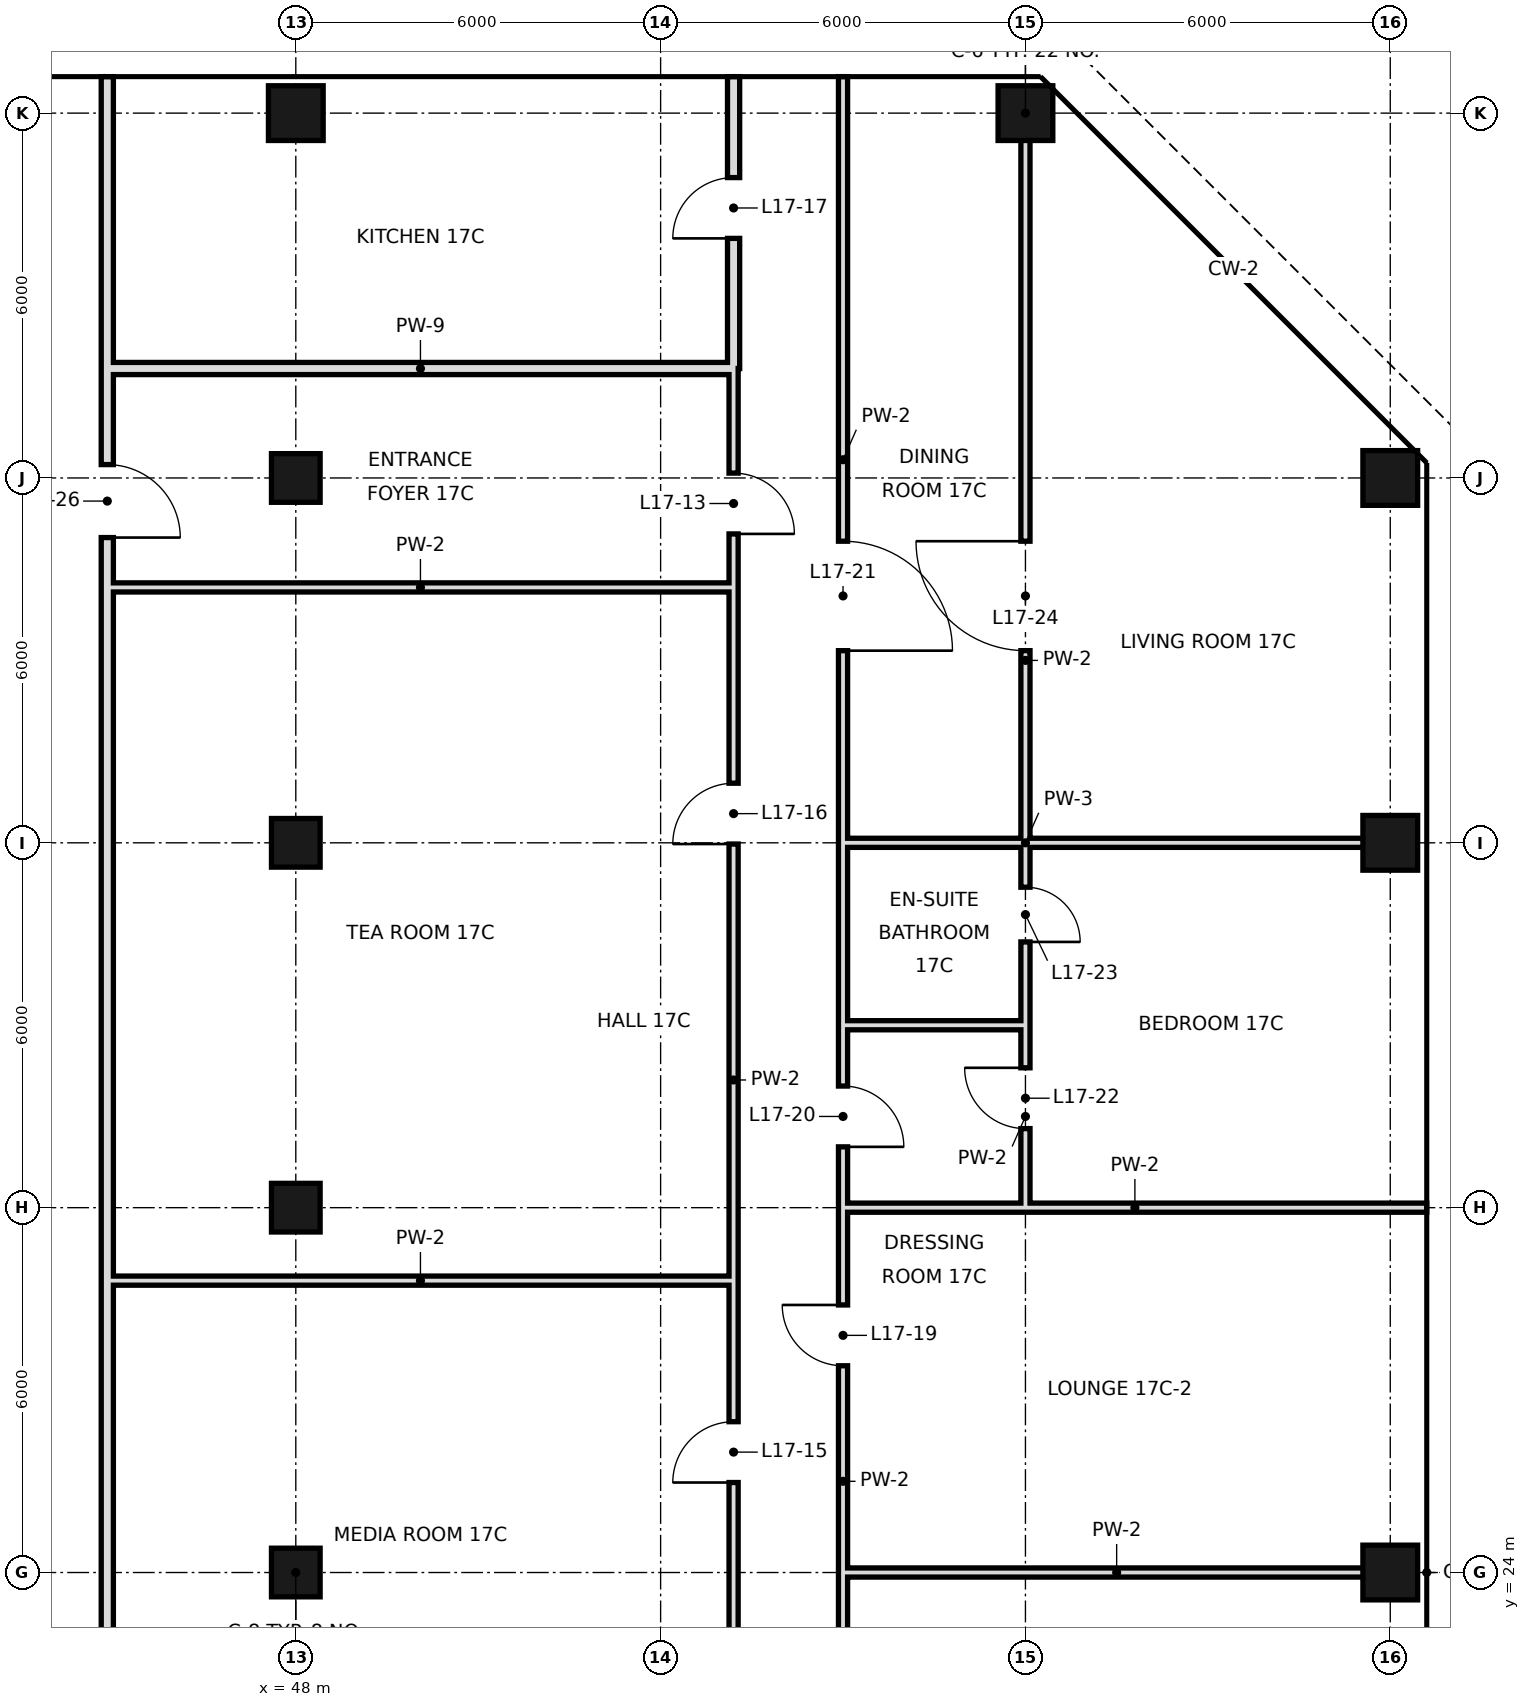
"""IFC4 building model, lengths in metres.
Left out: names, types, materials, properties, quantities, classifications, styles, units other than length and angle.
Written with IfcOpenShell. Run it as: python <this file> out.ifc"""

import sys

from ifc_helpers import new_model, si_unit, direction, frame, frame_2d, origin, origin_2d, place, context, subcontext, project, spatial, rectangle, hollow_rectangle, extrude, element, fill, save


model = new_model("IFC4")
c1 = context("Model", 3, precision=1e-05, world=origin(), true_north=direction((0.0, 1.0)))
c2 = subcontext(c1, "Body", "Model", "MODEL_VIEW")
j1 = project(units=[si_unit("LENGTHUNIT", "METRE"), si_unit("PLANEANGLEUNIT", "RADIAN")], contexts=[c1])
p1 = place(None, origin())
s1 = spatial("IfcSite", under=j1, at=p1, CompositionType="ELEMENT")
p2 = place(p1, origin())
s2 = spatial("IfcBuilding", under=s1, at=p2, CompositionType="ELEMENT")
p3 = place(p2, frame((0.0, 0.0, 82.2)))
s3 = spatial("IfcBuildingStorey", under=s2, at=p3, CompositionType="ELEMENT", Elevation=82.2)
for number, where, z_axis, x_axis in (
    (1, (48.0, 24.0, 0.0), (0.0, 0.0, 1.0), (1.0, 0.0, 0.0)),
    (2, (48.0, 30.0, 0.0), (0.0, 0.0, 1.0), (1.0, 0.0, 0.0)),
    (3, (48.0, 36.0, 0.0), (0.0, 0.0, 1.0), (1.0, 0.0, 0.0)),
    (4, (48.0, 42.0, 0.0), (0.0, 0.0, 1.0), (1.0, 0.0, 0.0)),
):
    element("IfcColumn", number, at=place(p3, frame(where, z_axis=z_axis, x_axis=x_axis)), inside=s3, PredefinedType="COLUMN", context=c2, shape_type="SweptSolid", body=[
        extrude(hollow_rectangle(XDim=0.8, YDim=0.8, WallThickness=0.04, at=origin_2d()), origin(), (0.0, 0.0, 1.0), 3.6),
    ])
for number, where, z_axis, x_axis in (
    (5, (48.0, 48.0, 0.0), (0.0, 0.0, 1.0), (1.0, 0.0, 0.0)),
    (6, (60.0, 48.0, 0.0), (0.0, 0.0, 1.0), (1.0, 0.0, 0.0)),
    (7, (66.0, 24.0, 0.0), (0.0, 0.0, 1.0), (1.0, 0.0, 0.0)),
    (8, (66.0, 36.0, 0.0), (0.0, 0.0, 1.0), (1.0, 0.0, 0.0)),
    (9, (66.0, 42.0, 0.0), (0.0, 0.0, 1.0), (1.0, 0.0, 0.0)),
):
    element("IfcColumn", number, at=place(p3, frame(where, z_axis=z_axis, x_axis=x_axis)), inside=s3, PredefinedType="COLUMN", context=c2, shape_type="SweptSolid", body=[
        extrude(hollow_rectangle(XDim=0.9, YDim=0.9, WallThickness=0.045, at=origin_2d()), origin(), (0.0, 0.0, 1.0), 3.6),
    ])
p4 = place(p3, frame((44.9, 18.7, 0.0), z_axis=(0.0, 0.0, 1.0), x_axis=(0.0, 1.0, 0.0)))
e10 = element("IfcWall", 10, at=p4, inside=s3, PredefinedType="SOLIDWALL", context=c2, shape_type="SweptSolid", body=[
    extrude(rectangle(XDim=25.1, YDim=0.2, at=frame_2d((12.55, 0.0))), origin(), (0.0, 0.0, 1.0), 2.97),
])
p5 = place(p4, frame((22.32, 0.0, 0.0)))
e11 = element("IfcOpeningElement", 11, at=p5, cuts=e10, PredefinedType="OPENING", context=c2, shape_type="SweptSolid", body=[
    extrude(rectangle(XDim=1.2, YDim=2.4, at=frame_2d((0.6, 1.2))), frame((0.0, 0.11, 0.0), z_axis=(0.0, -1.0, 0.0), x_axis=(1.0, 0.0, 0.0)), (0.0, 0.0, 1.0), 0.22),
])
p6 = place(p3, frame((44.9, 43.8, 0.0), z_axis=(0.0, 0.0, 1.0), x_axis=(0.0, 1.0, 0.0)))
e12 = element("IfcWall", 12, at=p6, inside=s3, PredefinedType="SOLIDWALL", context=c2, shape_type="SweptSolid", body=[
    extrude(rectangle(XDim=4.8, YDim=0.2, at=frame_2d((2.4, 0.0))), origin(), (0.0, 0.0, 1.0), 2.72),
])
p7 = place(p3, frame((55.2, 43.8, 0.0), z_axis=(0.0, 0.0, 1.0), x_axis=(0.0, 1.0, 0.0)))
e13 = element("IfcWall", 13, at=p7, inside=s3, PredefinedType="SOLIDWALL", context=c2, shape_type="SweptSolid", body=[
    extrude(rectangle(XDim=4.8, YDim=0.2, at=frame_2d((2.4, 0.0))), origin(), (0.0, 0.0, 1.0), 2.72),
])
p8 = place(p7, frame((2.14, 0.0, 0.0)))
e14 = element("IfcOpeningElement", 14, at=p8, cuts=e13, PredefinedType="OPENING", context=c2, shape_type="SweptSolid", body=[
    extrude(rectangle(XDim=1.0, YDim=2.4, at=frame_2d((0.5, 1.2))), frame((0.0, 0.11, 0.0), z_axis=(0.0, -1.0, 0.0), x_axis=(1.0, 0.0, 0.0)), (0.0, 0.0, 1.0), 0.22),
])
p9 = place(p3, frame((55.2, 20.4, 0.0), z_axis=(0.0, 0.0, 1.0), x_axis=(0.0, 1.0, 0.0)))
e15 = element("IfcWall", 15, at=p9, inside=s3, PredefinedType="PARTITIONING", context=c2, shape_type="SweptSolid", body=[
    extrude(rectangle(XDim=23.4, YDim=0.15, at=frame_2d((11.7, 0.0))), origin(), (0.0, 0.0, 1.0), 3.42),
])
p10 = place(p9, frame((20.68, 0.0, 0.0)))
e16 = element("IfcOpeningElement", 16, at=p10, cuts=e15, PredefinedType="OPENING", context=c2, shape_type="SweptSolid", body=[
    extrude(rectangle(XDim=1.0, YDim=2.4, at=frame_2d((0.5, 1.2))), frame((0.0, 0.085, 0.0), z_axis=(0.0, -1.0, 0.0), x_axis=(1.0, 0.0, 0.0)), (0.0, 0.0, 1.0), 0.17),
])
p11 = place(p9, frame((5.08, 0.0, 0.0)))
e17 = element("IfcOpeningElement", 17, at=p11, cuts=e15, PredefinedType="OPENING", context=c2, shape_type="SweptSolid", body=[
    extrude(rectangle(XDim=1.0, YDim=2.4, at=frame_2d((0.5, 1.2))), frame((0.0, 0.085, 0.0), z_axis=(0.0, -1.0, 0.0), x_axis=(1.0, 0.0, 0.0)), (0.0, 0.0, 1.0), 0.17),
])
p12 = place(p9, frame((15.58, 0.0, 0.0)))
e18 = element("IfcOpeningElement", 18, at=p12, cuts=e15, PredefinedType="OPENING", context=c2, shape_type="SweptSolid", body=[
    extrude(rectangle(XDim=1.0, YDim=2.4, at=frame_2d((0.5, 1.2))), frame((0.0, 0.085, 0.0), z_axis=(0.0, -1.0, 0.0), x_axis=(1.0, 0.0, 0.0)), (0.0, 0.0, 1.0), 0.17),
])
p13 = place(p3, frame((57.0, 18.0, 0.0), z_axis=(0.0, 0.0, 1.0), x_axis=(0.0, 1.0, 0.0)))
e19 = element("IfcWall", 19, at=p13, inside=s3, PredefinedType="PARTITIONING", context=c2, shape_type="SweptSolid", body=[
    extrude(rectangle(XDim=15.0, YDim=0.15, at=frame_2d((7.5, 0.0))), origin(), (0.0, 0.0, 1.0), 3.42),
])
p14 = place(p13, frame((1.6, 0.0, 0.0)))
e20 = element("IfcOpeningElement", 20, at=p14, cuts=e19, PredefinedType="OPENING", context=c2, shape_type="SweptSolid", body=[
    extrude(rectangle(XDim=1.0, YDim=2.4, at=frame_2d((0.5, 1.2))), frame((0.0, 0.085, 0.0), z_axis=(0.0, -1.0, 0.0), x_axis=(1.0, 0.0, 0.0)), (0.0, 0.0, 1.0), 0.17),
])
p15 = place(p13, frame((9.4, 0.0, 0.0)))
e21 = element("IfcOpeningElement", 21, at=p15, cuts=e19, PredefinedType="OPENING", context=c2, shape_type="SweptSolid", body=[
    extrude(rectangle(XDim=1.0, YDim=2.4, at=frame_2d((0.5, 1.2))), frame((0.0, 0.085, 0.0), z_axis=(0.0, -1.0, 0.0), x_axis=(1.0, 0.0, 0.0)), (0.0, 0.0, 1.0), 0.17),
])
p16 = place(p13, frame((13.0, 0.0, 0.0)))
e22 = element("IfcOpeningElement", 22, at=p16, cuts=e19, PredefinedType="OPENING", context=c2, shape_type="SweptSolid", body=[
    extrude(rectangle(XDim=1.0, YDim=2.4, at=frame_2d((0.5, 1.2))), frame((0.0, 0.085, 0.0), z_axis=(0.0, -1.0, 0.0), x_axis=(1.0, 0.0, 0.0)), (0.0, 0.0, 1.0), 0.17),
])
p17 = place(p3, frame((57.0, 36.0, 0.0), z_axis=(0.0, 0.0, 1.0), x_axis=(0.0, 1.0, 0.0)))
e23 = element("IfcWall", 23, at=p17, inside=s3, PredefinedType="PARTITIONING", context=c2, shape_type="SweptSolid", body=[
    extrude(rectangle(XDim=12.6, YDim=0.15, at=frame_2d((6.3, 0.0))), origin(), (0.0, 0.0, 1.0), 3.42),
])
p18 = place(p17, frame((3.16, 0.0, 0.0)))
e24 = element("IfcOpeningElement", 24, at=p18, cuts=e23, PredefinedType="OPENING", context=c2, shape_type="SweptSolid", body=[
    extrude(rectangle(XDim=1.8, YDim=2.4, at=frame_2d((0.9, 1.2))), frame((0.0, 0.085, 0.0), z_axis=(0.0, -1.0, 0.0), x_axis=(1.0, 0.0, 0.0)), (0.0, 0.0, 1.0), 0.17),
])
p19 = place(p3, frame((57.0, 33.0, 0.0), z_axis=(0.0, 0.0, 1.0), x_axis=(0.0, 1.0, 0.0)))
e25 = element("IfcWall", 25, at=p19, inside=s3, PredefinedType="PARTITIONING", context=c2, shape_type="SweptSolid", body=[
    extrude(rectangle(XDim=3.0, YDim=0.15, at=frame_2d((1.5, 0.0))), origin(), (0.0, 0.0, 1.0), 3.42),
])
p20 = place(p3, frame((60.0, 30.0, 0.0), z_axis=(0.0, 0.0, 1.0), x_axis=(0.0, 1.0, 0.0)))
e26 = element("IfcWall", 26, at=p20, inside=s3, PredefinedType="PARTITIONING", context=c2, shape_type="SweptSolid", body=[
    extrude(rectangle(XDim=3.0, YDim=0.15, at=frame_2d((1.5, 0.0))), origin(), (0.0, 0.0, 1.0), 3.42),
])
p21 = place(p20, frame((1.3, 0.0, 0.0)))
e27 = element("IfcOpeningElement", 27, at=p21, cuts=e26, PredefinedType="OPENING", context=c2, shape_type="SweptSolid", body=[
    extrude(rectangle(XDim=1.0, YDim=2.4, at=frame_2d((0.5, 1.2))), frame((0.0, 0.085, 0.0), z_axis=(0.0, -1.0, 0.0), x_axis=(1.0, 0.0, 0.0)), (0.0, 0.0, 1.0), 0.17),
])
p22 = place(p3, frame((60.0, 36.0, 0.0), z_axis=(0.0, 0.0, 1.0), x_axis=(0.0, 1.0, 0.0)))
e28 = element("IfcWall", 28, at=p22, inside=s3, PredefinedType="PARTITIONING", context=c2, shape_type="SweptSolid", body=[
    extrude(rectangle(XDim=12.0, YDim=0.15, at=frame_2d((6.0, 0.0))), origin(), (0.0, 0.0, 1.0), 3.42),
])
p23 = place(p22, frame((3.16, 0.0, 0.0)))
e29 = element("IfcOpeningElement", 29, at=p23, cuts=e28, PredefinedType="OPENING", context=c2, shape_type="SweptSolid", body=[
    extrude(rectangle(XDim=1.8, YDim=2.4, at=frame_2d((0.9, 1.2))), frame((0.0, 0.085, 0.0), z_axis=(0.0, -1.0, 0.0), x_axis=(1.0, 0.0, 0.0)), (0.0, 0.0, 1.0), 0.17),
])
p24 = place(p3, frame((60.0, 33.0, 0.0), z_axis=(0.0, 0.0, 1.0), x_axis=(0.0, 1.0, 0.0)))
e30 = element("IfcWall", 30, at=p24, inside=s3, PredefinedType="PARTITIONING", context=c2, shape_type="SweptSolid", body=[
    extrude(rectangle(XDim=3.0, YDim=0.15, at=frame_2d((1.5, 0.0))), origin(), (0.0, 0.0, 1.0), 3.42),
])
p25 = place(p24, frame((1.37, 0.0, 0.0)))
e31 = element("IfcOpeningElement", 31, at=p25, cuts=e30, PredefinedType="OPENING", context=c2, shape_type="SweptSolid", body=[
    extrude(rectangle(XDim=0.9, YDim=2.4, at=frame_2d((0.45, 1.2))), frame((0.0, 0.085, 0.0), z_axis=(0.0, -1.0, 0.0), x_axis=(1.0, 0.0, 0.0)), (0.0, 0.0, 1.0), 0.17),
])
p26 = place(p3, frame((57.0, 24.0, 0.0), z_axis=(0.0, 0.0, 1.0), x_axis=(1.0, 0.0, 0.0)))
e32 = element("IfcWall", 32, at=p26, inside=s3, PredefinedType="PARTITIONING", context=c2, shape_type="SweptSolid", body=[
    extrude(rectangle(XDim=9.0, YDim=0.15, at=frame_2d((4.5, 0.0))), origin(), (0.0, 0.0, 1.0), 2.52),
])
p27 = place(p3, frame((44.9, 28.8, 0.0), z_axis=(0.0, 0.0, 1.0), x_axis=(1.0, 0.0, 0.0)))
e33 = element("IfcWall", 33, at=p27, inside=s3, PredefinedType="PARTITIONING", context=c2, shape_type="SweptSolid", body=[
    extrude(rectangle(XDim=10.3, YDim=0.15, at=frame_2d((5.15, 0.0))), origin(), (0.0, 0.0, 1.0), 3.42),
])
p28 = place(p3, frame((57.0, 30.0, 0.0), z_axis=(0.0, 0.0, 1.0), x_axis=(1.0, 0.0, 0.0)))
e34 = element("IfcWall", 34, at=p28, inside=s3, PredefinedType="PARTITIONING", context=c2, shape_type="SweptSolid", body=[
    extrude(rectangle(XDim=9.6, YDim=0.15, at=frame_2d((4.8, 0.0))), origin(), (0.0, 0.0, 1.0), 2.52),
])
p29 = place(p3, frame((57.0, 33.0, 0.0), z_axis=(0.0, 0.0, 1.0), x_axis=(1.0, 0.0, 0.0)))
e35 = element("IfcWall", 35, at=p29, inside=s3, PredefinedType="PARTITIONING", context=c2, shape_type="SweptSolid", body=[
    extrude(rectangle(XDim=3.0, YDim=0.15, at=frame_2d((1.5, 0.0))), origin(), (0.0, 0.0, 1.0), 3.42),
])
p30 = place(p3, frame((60.0, 36.0, 0.0), z_axis=(0.0, 0.0, 1.0), x_axis=(1.0, 0.0, 0.0)))
e36 = element("IfcWall", 36, at=p30, inside=s3, PredefinedType="PARTITIONING", context=c2, shape_type="SweptSolid", body=[
    extrude(rectangle(XDim=6.0, YDim=0.15, at=frame_2d((3.0, 0.0))), origin(), (0.0, 0.0, 1.0), 2.52),
])
p31 = place(p3, frame((57.0, 36.0, 0.0), z_axis=(0.0, 0.0, 1.0), x_axis=(1.0, 0.0, 0.0)))
e37 = element("IfcWall", 37, at=p31, inside=s3, PredefinedType="PARTITIONING", context=c2, shape_type="SweptSolid", body=[
    extrude(rectangle(XDim=3.0, YDim=0.15, at=frame_2d((1.5, 0.0))), origin(), (0.0, 0.0, 1.0), 2.52),
])
p32 = place(p3, frame((44.9, 40.2, 0.0), z_axis=(0.0, 0.0, 1.0), x_axis=(1.0, 0.0, 0.0)))
e38 = element("IfcWall", 38, at=p32, inside=s3, PredefinedType="PARTITIONING", context=c2, shape_type="SweptSolid", body=[
    extrude(rectangle(XDim=10.3, YDim=0.15, at=frame_2d((5.15, 0.0))), origin(), (0.0, 0.0, 1.0), 3.42),
])
p33 = place(p3, frame((44.9, 43.8, 0.0), z_axis=(0.0, 0.0, 1.0), x_axis=(1.0, 0.0, 0.0)))
e39 = element("IfcWall", 39, at=p33, inside=s3, PredefinedType="SOLIDWALL", context=c2, shape_type="SweptSolid", body=[
    extrude(rectangle(XDim=10.3, YDim=0.2, at=frame_2d((5.15, 0.0))), origin(), (0.0, 0.0, 1.0), 2.97),
])
p34 = place(p10, frame((1.0, 0.0, 0.0), z_axis=(0.0, 0.0, 1.0), x_axis=(-1.0, 0.0, 0.0)))
e40 = element("IfcDoor", 40, at=p34, inside=s3, OperationType="SINGLE_SWING_RIGHT", PredefinedType="DOOR", context=c2, shape_type="SweptSolid", body=[
    extrude(rectangle(XDim=1.0, YDim=2.4, at=frame_2d((0.5, 1.2))), frame((0.0, 0.025, 0.0), z_axis=(0.0, -1.0, 0.0), x_axis=(1.0, 0.0, 0.0)), (0.0, 0.0, 1.0), 0.05),
])
fill(e16, e40)
p35 = place(p11, origin())
e41 = element("IfcDoor", 41, at=p35, inside=s3, OperationType="SINGLE_SWING_LEFT", PredefinedType="DOOR", context=c2, shape_type="SweptSolid", body=[
    extrude(rectangle(XDim=1.0, YDim=2.4, at=frame_2d((0.5, 1.2))), frame((0.0, 0.025, 0.0), z_axis=(0.0, -1.0, 0.0), x_axis=(1.0, 0.0, 0.0)), (0.0, 0.0, 1.0), 0.05),
])
fill(e17, e41)
p36 = place(p12, origin())
e42 = element("IfcDoor", 42, at=p36, inside=s3, OperationType="SINGLE_SWING_LEFT", PredefinedType="DOOR", context=c2, shape_type="SweptSolid", body=[
    extrude(rectangle(XDim=1.0, YDim=2.4, at=frame_2d((0.5, 1.2))), frame((0.0, 0.025, 0.0), z_axis=(0.0, -1.0, 0.0), x_axis=(1.0, 0.0, 0.0)), (0.0, 0.0, 1.0), 0.05),
])
fill(e18, e42)
p37 = place(p8, origin())
e43 = element("IfcDoor", 43, at=p37, inside=s3, OperationType="SINGLE_SWING_LEFT", PredefinedType="DOOR", context=c2, shape_type="SweptSolid", body=[
    extrude(rectangle(XDim=1.0, YDim=2.4, at=frame_2d((0.5, 1.2))), frame((0.0, 0.025, 0.0), z_axis=(0.0, -1.0, 0.0), x_axis=(1.0, 0.0, 0.0)), (0.0, 0.0, 1.0), 0.05),
])
fill(e14, e43)
p38 = place(p15, frame((1.0, 0.0, 0.0), z_axis=(0.0, 0.0, 1.0), x_axis=(-1.0, 0.0, 0.0)))
e44 = element("IfcDoor", 44, at=p38, inside=s3, OperationType="SINGLE_SWING_LEFT", PredefinedType="DOOR", context=c2, shape_type="SweptSolid", body=[
    extrude(rectangle(XDim=1.0, YDim=2.4, at=frame_2d((0.5, 1.2))), frame((0.0, 0.025, 0.0), z_axis=(0.0, -1.0, 0.0), x_axis=(1.0, 0.0, 0.0)), (0.0, 0.0, 1.0), 0.05),
])
fill(e21, e44)
p39 = place(p16, frame((1.0, 0.0, 0.0), z_axis=(0.0, 0.0, 1.0), x_axis=(-1.0, 0.0, 0.0)))
e45 = element("IfcDoor", 45, at=p39, inside=s3, OperationType="SINGLE_SWING_RIGHT", PredefinedType="DOOR", context=c2, shape_type="SweptSolid", body=[
    extrude(rectangle(XDim=1.0, YDim=2.4, at=frame_2d((0.5, 1.2))), frame((0.0, 0.025, 0.0), z_axis=(0.0, -1.0, 0.0), x_axis=(1.0, 0.0, 0.0)), (0.0, 0.0, 1.0), 0.05),
])
fill(e22, e45)
p40 = place(p18, frame((1.8, 0.0, 0.0), z_axis=(0.0, 0.0, 1.0), x_axis=(-1.0, 0.0, 0.0)))
e46 = element("IfcDoor", 46, at=p40, inside=s3, OperationType="SINGLE_SWING_RIGHT", PredefinedType="DOOR", context=c2, shape_type="SweptSolid", body=[
    extrude(rectangle(XDim=1.8, YDim=2.4, at=frame_2d((0.9, 1.2))), frame((0.0, 0.025, 0.0), z_axis=(0.0, -1.0, 0.0), x_axis=(1.0, 0.0, 0.0)), (0.0, 0.0, 1.0), 0.05),
])
fill(e24, e46)
p41 = place(p21, frame((1.0, 0.0, 0.0), z_axis=(0.0, 0.0, 1.0), x_axis=(-1.0, 0.0, 0.0)))
e47 = element("IfcDoor", 47, at=p41, inside=s3, OperationType="SINGLE_SWING_LEFT", PredefinedType="DOOR", context=c2, shape_type="SweptSolid", body=[
    extrude(rectangle(XDim=1.0, YDim=2.4, at=frame_2d((0.5, 1.2))), frame((0.0, 0.025, 0.0), z_axis=(0.0, -1.0, 0.0), x_axis=(1.0, 0.0, 0.0)), (0.0, 0.0, 1.0), 0.05),
])
fill(e27, e47)
p42 = place(p25, frame((0.9, 0.0, 0.0), z_axis=(0.0, 0.0, 1.0), x_axis=(-1.0, 0.0, 0.0)))
e48 = element("IfcDoor", 48, at=p42, inside=s3, OperationType="SINGLE_SWING_RIGHT", PredefinedType="DOOR", context=c2, shape_type="SweptSolid", body=[
    extrude(rectangle(XDim=0.9, YDim=2.4, at=frame_2d((0.45, 1.2))), frame((0.0, 0.025, 0.0), z_axis=(0.0, -1.0, 0.0), x_axis=(1.0, 0.0, 0.0)), (0.0, 0.0, 1.0), 0.05),
])
fill(e31, e48)
p43 = place(p23, frame((1.8, 0.0, 0.0), z_axis=(0.0, 0.0, 1.0), x_axis=(-1.0, 0.0, 0.0)))
e49 = element("IfcDoor", 49, at=p43, inside=s3, OperationType="SINGLE_SWING_LEFT", PredefinedType="DOOR", context=c2, shape_type="SweptSolid", body=[
    extrude(rectangle(XDim=1.8, YDim=2.4, at=frame_2d((0.9, 1.2))), frame((0.0, 0.025, 0.0), z_axis=(0.0, -1.0, 0.0), x_axis=(1.0, 0.0, 0.0)), (0.0, 0.0, 1.0), 0.05),
])
fill(e29, e49)
p44 = place(p5, frame((1.2, 0.0, 0.0), z_axis=(0.0, 0.0, 1.0), x_axis=(-1.0, 0.0, 0.0)))
e50 = element("IfcDoor", 50, at=p44, inside=s3, OperationType="SINGLE_SWING_RIGHT", PredefinedType="DOOR", context=c2, shape_type="SweptSolid", body=[
    extrude(rectangle(XDim=1.2, YDim=2.4, at=frame_2d((0.6, 1.2))), frame((0.0, 0.025, 0.0), z_axis=(0.0, -1.0, 0.0), x_axis=(1.0, 0.0, 0.0)), (0.0, 0.0, 1.0), 0.05),
])
fill(e11, e50)
save(model, sys.argv[1])
